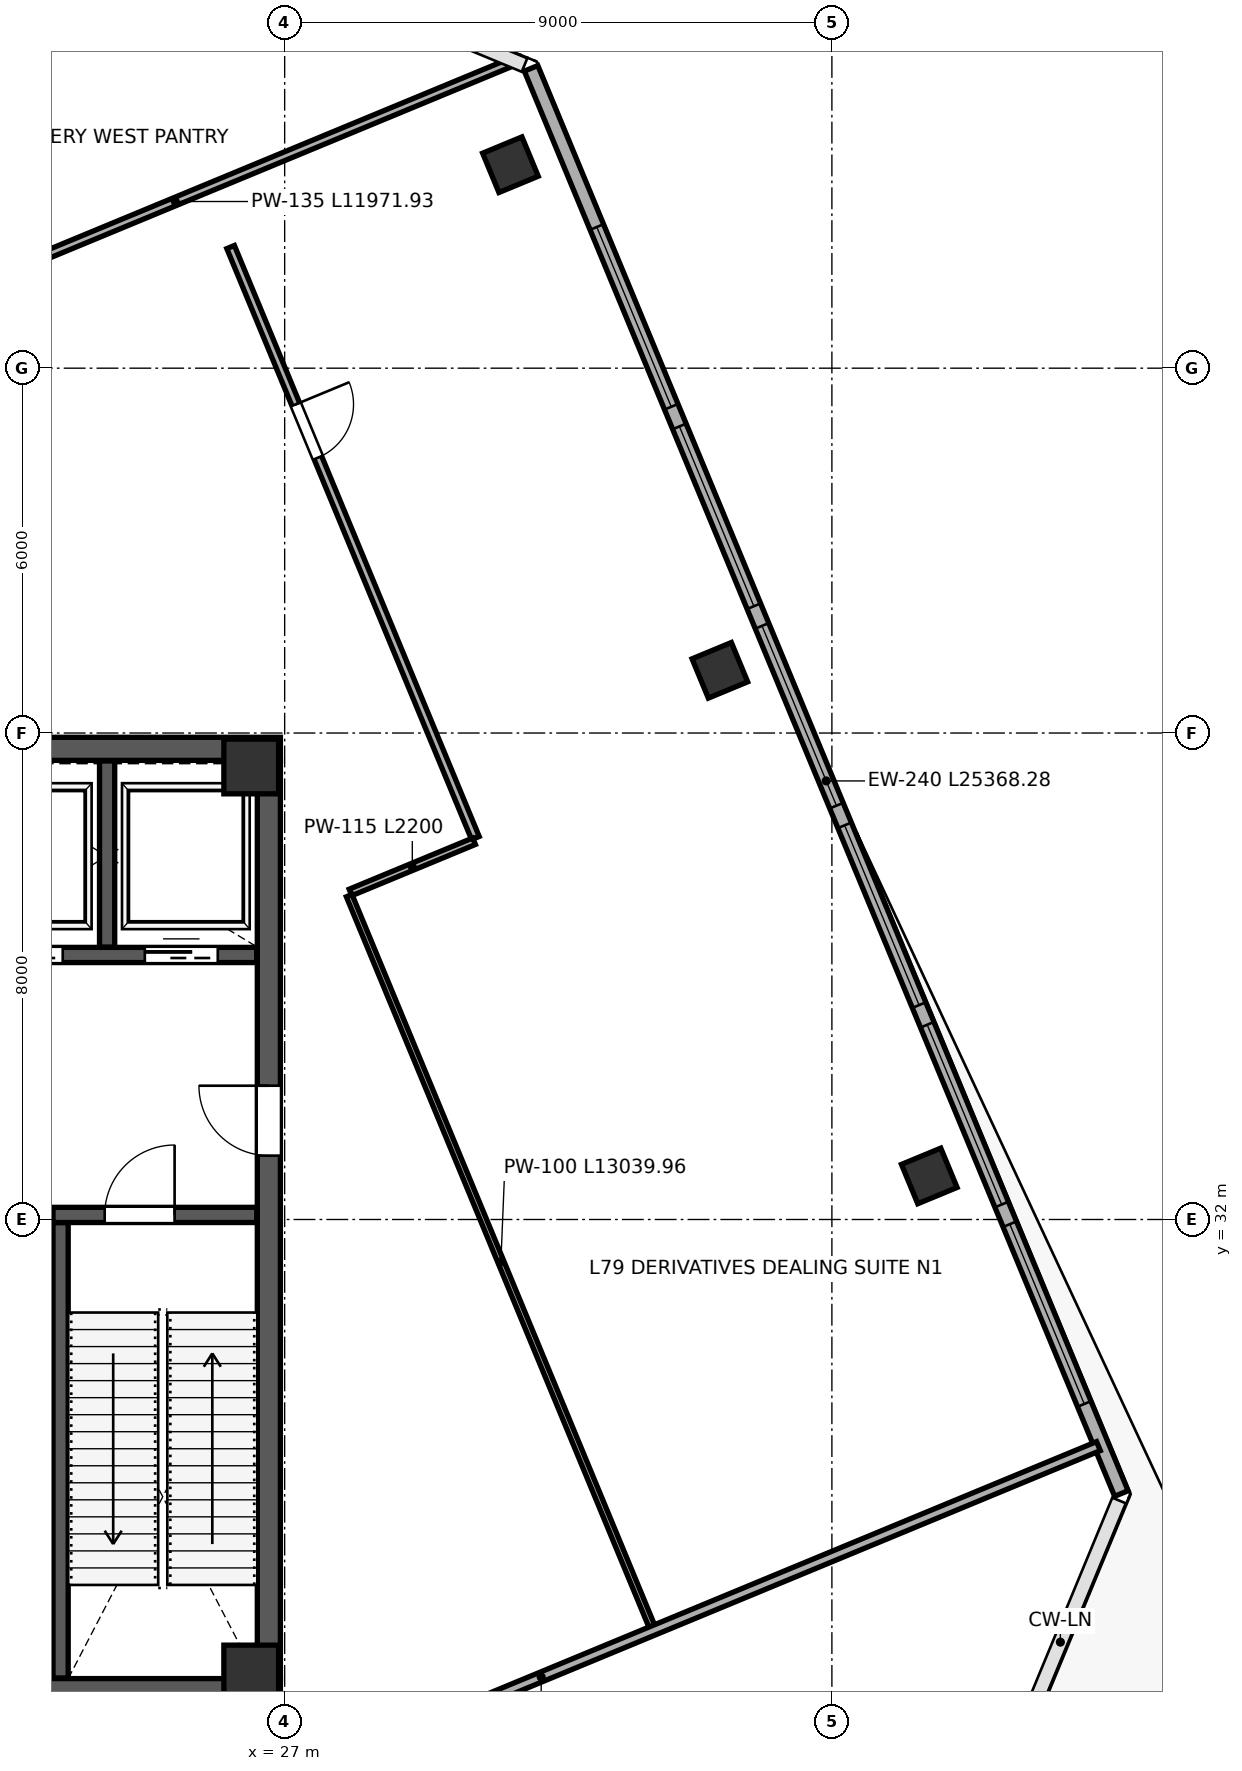
"""IFC4 building model, lengths in metres.
Left out: names, types, materials, properties, quantities, classifications, styles, units other than length and angle.
Written with IfcOpenShell. Run it as: python <this file> out.ifc"""

import sys

from ifc_helpers import new_model, si_unit, direction, frame, frame_2d, origin, origin_2d, place, context, subcontext, project, spatial, rectangle, extrude, source, transform, mapped, element, fill, save


model = new_model("IFC4")
c1 = context("Model", 3, precision=1e-05, world=origin(), true_north=direction((0.0, 1.0)))
c2 = subcontext(c1, "Body", "Model", "MODEL_VIEW")
j1 = project(units=[si_unit("LENGTHUNIT", "METRE"), si_unit("PLANEANGLEUNIT", "RADIAN")], contexts=[c1])
p1 = place(None, origin())
s1 = spatial("IfcSite", under=j1, at=p1, CompositionType="ELEMENT")
p2 = place(p1, origin())
s2 = spatial("IfcBuilding", under=s1, at=p2, CompositionType="ELEMENT")
p3 = place(p2, frame((0.0, 0.0, 349.2)))
s3 = spatial("IfcBuildingStorey", under=s2, at=p3, CompositionType="ELEMENT", Elevation=349.2)
m1 = source(origin(), c2, "Body", "SweptSolid", [
    extrude(rectangle(XDim=0.9, YDim=0.9, at=origin_2d()), origin(), (0.0, 0.0, 1.0), 5.999),
])
for number, where, z_axis, x_axis in (
    (1, (26.45, 24.55, 0.001), (0.0, 0.0, 1.0), (1.0, 0.0, 0.0)),
    (2, (26.45, 39.45, 0.001), (0.0, 0.0, 1.0), (1.0, 0.0, 0.0)),
):
    element("IfcColumn", number, at=place(p3, frame(where, z_axis=z_axis, x_axis=x_axis)), inside=s3, PredefinedType="COLUMN", context=c2, shape_type="MappedRepresentation", body=[
        mapped(m1, transform((0.0, 0.0, 0.0), scale=1.0)),
    ])
m2 = source(origin(), c2, "Body", "SweptSolid", [
    extrude(rectangle(XDim=0.7, YDim=0.7, at=origin_2d()), origin(), (0.0, 0.0, 1.0), 5.999),
])
for number, where, z_axis, x_axis in (
    (3, (30.713, 49.346, 0.001), (0.0, 0.0, 1.0), (-0.383, 0.924, 0.0)),
    (4, (34.157, 41.031, 0.001), (0.0, 0.0, 1.0), (-0.383, 0.924, 0.0)),
    (5, (37.602, 32.716, 0.001), (0.0, 0.0, 1.0), (-0.383, 0.924, 0.0)),
):
    element("IfcColumn", number, at=place(p3, frame(where, z_axis=z_axis, x_axis=x_axis)), inside=s3, PredefinedType="COLUMN", context=c2, shape_type="MappedRepresentation", body=[
        mapped(m2, transform((0.0, 0.0, 0.0), scale=1.0)),
    ])
p4 = place(p3, frame((40.761, 27.494, 0.0), z_axis=(0.0, 0.0, 1.0), x_axis=(-0.382690925775, 0.923876428604, 0.0)))
e6 = element("IfcWall", 6, at=p4, inside=s3, PredefinedType="SOLIDWALL", context=c2, shape_type="SweptSolid", body=[
    extrude(rectangle(XDim=25.368, YDim=0.24, at=frame_2d((12.684, 0.0))), origin(), (0.0, 0.0, 1.0), 5.76),
])
p5 = place(p4, frame((1.594, 0.0, 0.45)))
e7 = element("IfcOpeningElement", 7, at=p5, cuts=e6, PredefinedType="OPENING", context=c2, shape_type="SweptSolid", body=[
    extrude(rectangle(XDim=3.2, YDim=2.5, at=frame_2d((1.6, 1.25))), frame((0.0, 0.13, 0.0), z_axis=(0.0, -1.0, 0.0), x_axis=(1.0, 0.0, 0.0)), (0.0, 0.0, 1.0), 0.26),
])
p6 = place(p4, frame((5.144, 0.0, 0.45)))
e8 = element("IfcOpeningElement", 8, at=p6, cuts=e6, PredefinedType="OPENING", context=c2, shape_type="SweptSolid", body=[
    extrude(rectangle(XDim=3.2, YDim=2.5, at=frame_2d((1.6, 1.25))), frame((0.0, 0.13, 0.0), z_axis=(0.0, -1.0, 0.0), x_axis=(1.0, 0.0, 0.0)), (0.0, 0.0, 1.0), 0.26),
])
p7 = place(p4, frame((8.694, 0.0, 0.45)))
e9 = element("IfcOpeningElement", 9, at=p7, cuts=e6, PredefinedType="OPENING", context=c2, shape_type="SweptSolid", body=[
    extrude(rectangle(XDim=3.2, YDim=2.5, at=frame_2d((1.6, 1.25))), frame((0.0, 0.13, 0.0), z_axis=(0.0, -1.0, 0.0), x_axis=(1.0, 0.0, 0.0)), (0.0, 0.0, 1.0), 0.26),
])
p8 = place(p4, frame((12.244, 0.0, 0.45)))
e10 = element("IfcOpeningElement", 10, at=p8, cuts=e6, PredefinedType="OPENING", context=c2, shape_type="SweptSolid", body=[
    extrude(rectangle(XDim=3.2, YDim=2.5, at=frame_2d((1.6, 1.25))), frame((0.0, 0.13, 0.0), z_axis=(0.0, -1.0, 0.0), x_axis=(1.0, 0.0, 0.0)), (0.0, 0.0, 1.0), 0.26),
])
p9 = place(p4, frame((15.794, 0.0, 0.45)))
e11 = element("IfcOpeningElement", 11, at=p9, cuts=e6, PredefinedType="OPENING", context=c2, shape_type="SweptSolid", body=[
    extrude(rectangle(XDim=3.2, YDim=2.5, at=frame_2d((1.6, 1.25))), frame((0.0, 0.13, 0.0), z_axis=(0.0, -1.0, 0.0), x_axis=(1.0, 0.0, 0.0)), (0.0, 0.0, 1.0), 0.26),
])
p10 = place(p4, frame((19.344, 0.0, 0.45)))
e12 = element("IfcOpeningElement", 12, at=p10, cuts=e6, PredefinedType="OPENING", context=c2, shape_type="SweptSolid", body=[
    extrude(rectangle(XDim=3.2, YDim=2.5, at=frame_2d((1.6, 1.25))), frame((0.0, 0.13, 0.0), z_axis=(0.0, -1.0, 0.0), x_axis=(1.0, 0.0, 0.0)), (0.0, 0.0, 1.0), 0.26),
])
p11 = place(p3, frame((26.171, 52.953, 0.0), z_axis=(0.0, 0.0, 1.0), x_axis=(-0.923878251708, -0.382686524484, 0.0)))
e13 = element("IfcWall", 13, at=p11, inside=s3, PredefinedType="SOLIDWALL", context=c2, shape_type="SweptSolid", body=[
    extrude(rectangle(XDim=26.668, YDim=0.24, at=frame_2d((13.334, 0.0))), origin(), (0.0, 0.0, 1.0), 5.76),
])
p12 = place(p11, frame((13.454, 0.0, 0.45)))
e14 = element("IfcOpeningElement", 14, at=p12, cuts=e13, PredefinedType="OPENING", context=c2, shape_type="SweptSolid", body=[
    extrude(rectangle(XDim=3.2, YDim=2.5, at=frame_2d((1.6, 1.25))), frame((0.0, 0.13, 0.0), z_axis=(0.0, -1.0, 0.0), x_axis=(1.0, 0.0, 0.0)), (0.0, 0.0, 1.0), 0.26),
])
p13 = place(p11, frame((21.304, 0.0, 0.45)))
e15 = element("IfcOpeningElement", 15, at=p13, cuts=e13, PredefinedType="OPENING", context=c2, shape_type="SweptSolid", body=[
    extrude(rectangle(XDim=3.2, YDim=2.5, at=frame_2d((1.6, 1.25))), frame((0.0, 0.13, 0.0), z_axis=(0.0, -1.0, 0.0), x_axis=(1.0, 0.0, 0.0)), (0.0, 0.0, 1.0), 0.26),
])
p14 = place(p3, frame((26.74, 24.45, 0.0), z_axis=(0.0, 0.0, 1.0), x_axis=(0.0, 1.0, 0.0)))
e16 = element("IfcWall", 16, at=p14, inside=s3, PredefinedType="SHEAR", context=c2, shape_type="SweptSolid", body=[
    extrude(rectangle(XDim=15.1, YDim=0.38, at=frame_2d((7.55, 0.0))), origin(), (0.0, 0.0, 1.0), 5.76),
])
p15 = place(p14, frame((8.6, 0.0, 0.0)))
e17 = element("IfcOpeningElement", 17, at=p15, cuts=e16, PredefinedType="OPENING", context=c2, shape_type="SweptSolid", body=[
    extrude(rectangle(XDim=1.15, YDim=2.2, at=frame_2d((0.575, 1.1))), frame((0.0, 0.2, 0.0), z_axis=(0.0, -1.0, 0.0), x_axis=(1.0, 0.0, 0.0)), (0.0, 0.0, 1.0), 0.4),
])
for number, where, z_axis, x_axis in (
    (18, (9.07, 24.26, 0.0), (0.0, 0.0, 1.0), (1.0, 0.0, 0.0)),
    (19, (9.07, 39.74, 0.0), (0.0, 0.0, 1.0), (1.0, 0.0, 0.0)),
):
    element("IfcWall", number, at=place(p3, frame(where, z_axis=z_axis, x_axis=x_axis)), inside=s3, PredefinedType="SHEAR", context=c2, shape_type="SweptSolid", body=[
        extrude(rectangle(XDim=17.86, YDim=0.38, at=frame_2d((8.93, 0.0))), origin(), (0.0, 0.0, 1.0), 5.76),
    ])
p16 = place(p3, frame((23.315, 24.46, 0.0), z_axis=(0.0, 0.0, 1.0), x_axis=(0.0, 1.0, 0.0)))
e20 = element("IfcWall", 20, at=p16, inside=s3, PredefinedType="SHEAR", context=c2, shape_type="SweptSolid", body=[
    extrude(rectangle(XDim=7.49, YDim=0.25, at=frame_2d((3.745, 0.0))), origin(), (0.0, 0.0, 1.0), 5.76),
])
p17 = place(p3, frame((23.19, 32.075, 0.0), z_axis=(0.0, 0.0, 1.0), x_axis=(1.0, 0.0, 0.0)))
e21 = element("IfcWall", 21, at=p17, inside=s3, PredefinedType="SHEAR", context=c2, shape_type="SweptSolid", body=[
    extrude(rectangle(XDim=3.35, YDim=0.25, at=frame_2d((1.675, 0.0))), origin(), (0.0, 0.0, 1.0), 5.76),
])
p18 = place(p17, frame((0.85, 0.0, 0.0)))
e22 = element("IfcOpeningElement", 22, at=p18, cuts=e21, PredefinedType="OPENING", context=c2, shape_type="SweptSolid", body=[
    extrude(rectangle(XDim=1.15, YDim=2.2, at=frame_2d((0.575, 1.1))), frame((0.0, 0.135, 0.0), z_axis=(0.0, -1.0, 0.0), x_axis=(1.0, 0.0, 0.0)), (0.0, 0.0, 1.0), 0.27),
])
p19 = place(p3, frame((21.45, 36.35, 0.0), z_axis=(0.0, 0.0, 1.0), x_axis=(1.0, 0.0, 0.0)))
e23 = element("IfcWall", 23, at=p19, inside=s3, PredefinedType="SHEAR", context=c2, shape_type="SweptSolid", body=[
    extrude(rectangle(XDim=5.09, YDim=0.25, at=frame_2d((2.545, 0.0))), origin(), (0.0, 0.0, 1.0), 5.76),
])
p20 = place(p19, frame((0.7, 0.0, 0.0)))
e24 = element("IfcOpeningElement", 24, at=p20, cuts=e23, PredefinedType="OPENING", context=c2, shape_type="SweptSolid", body=[
    extrude(rectangle(XDim=1.2, YDim=2.2, at=frame_2d((0.6, 1.1))), frame((0.0, 0.135, 0.0), z_axis=(0.0, -1.0, 0.0), x_axis=(1.0, 0.0, 0.0)), (0.0, 0.0, 1.0), 0.27),
])
p21 = place(p19, frame((3.25, 0.0, 0.0)))
e25 = element("IfcOpeningElement", 25, at=p21, cuts=e23, PredefinedType="OPENING", context=c2, shape_type="SweptSolid", body=[
    extrude(rectangle(XDim=1.2, YDim=2.2, at=frame_2d((0.6, 1.1))), frame((0.0, 0.135, 0.0), z_axis=(0.0, -1.0, 0.0), x_axis=(1.0, 0.0, 0.0)), (0.0, 0.0, 1.0), 0.27),
])
p22 = place(p3, frame((24.08, 36.48, 0.0), z_axis=(0.0, 0.0, 1.0), x_axis=(0.0, 1.0, 0.0)))
e26 = element("IfcWall", 26, at=p22, inside=s3, PredefinedType="SHEAR", context=c2, shape_type="SweptSolid", body=[
    extrude(rectangle(XDim=3.06, YDim=0.25, at=frame_2d((1.53, 0.0))), origin(), (0.0, 0.0, 1.0), 5.76),
])
p23 = place(p3, frame((26.111, 47.992, 0.0), z_axis=(0.0, 0.0, 1.0), x_axis=(0.382686563741, -0.923878235447, 0.0)))
e27 = element("IfcWall", 27, at=p23, inside=s3, PredefinedType="PARTITIONING", context=c2, shape_type="SweptSolid", body=[
    extrude(rectangle(XDim=10.52, YDim=0.135, at=frame_2d((5.26, 0.0))), origin(), (0.0, 0.0, 1.0), 5.76),
])
p24 = place(p23, frame((2.8, 0.0, 0.0)))
e28 = element("IfcOpeningElement", 28, at=p24, cuts=e27, PredefinedType="OPENING", context=c2, shape_type="SweptSolid", body=[
    extrude(rectangle(XDim=0.95, YDim=2.15, at=frame_2d((0.475, 1.075))), frame((0.0, 0.078, 0.0), z_axis=(0.0, -1.0, 0.0), x_axis=(1.0, 0.0, 0.0)), (0.0, 0.0, 1.0), 0.155),
])
p25 = place(p3, frame((28.083, 37.378, 0.0), z_axis=(0.0, 0.0, 1.0), x_axis=(0.923853160736, 0.382747093259, 0.0)))
e29 = element("IfcWall", 29, at=p25, inside=s3, PredefinedType="PARTITIONING", context=c2, shape_type="SweptSolid", body=[
    extrude(rectangle(XDim=2.2, YDim=0.115, at=frame_2d((1.1, 0.0))), origin(), (0.0, 0.0, 1.0), 5.76),
])
p26 = place(p3, frame((28.061, 37.326, 0.0), z_axis=(0.0, 0.0, 1.0), x_axis=(0.382702889353, -0.923871472923, 0.0)))
e30 = element("IfcWall", 30, at=p26, inside=s3, PredefinedType="PARTITIONING", context=c2, shape_type="SweptSolid", body=[
    extrude(rectangle(XDim=13.04, YDim=0.1, at=frame_2d((6.52, 0.0))), origin(), (0.0, 0.0, 1.0), 5.76),
])
p27 = place(p3, frame((19.671, 46.45, 0.0), z_axis=(0.0, 0.0, 1.0), x_axis=(0.923879139167, 0.38268438198, 0.0)))
e31 = element("IfcWall", 31, at=p27, inside=s3, PredefinedType="PARTITIONING", context=c2, shape_type="SweptSolid", body=[
    extrude(rectangle(XDim=11.972, YDim=0.135, at=frame_2d((5.986, 0.0))), origin(), (0.0, 0.0, 1.0), 5.76),
])
p28 = place(p3, frame((22.054, 20.68, 0.0), z_axis=(0.0, 0.0, 1.0), x_axis=(0.923880950116, 0.382680009946, 0.0)))
e32 = element("IfcWall", 32, at=p28, inside=s3, PredefinedType="PARTITIONING", context=c2, shape_type="SweptSolid", body=[
    extrude(rectangle(XDim=19.84, YDim=0.16, at=frame_2d((9.92, 0.0))), origin(), (0.0, 0.0, 1.0), 5.76),
])
m3 = source(origin(), c2, "Body", "SweptSolid", [
    extrude(rectangle(XDim=3.2, YDim=2.5, at=frame_2d((1.6, 1.25))), frame((0.0, 0.03, 0.0), z_axis=(0.0, -1.0, 0.0), x_axis=(1.0, 0.0, 0.0)), (0.0, 0.0, 1.0), 0.06),
])
p29 = place(p5, origin())
e33 = element("IfcWindow", 33, at=p29, inside=s3, PartitioningType="TRIPLE_PANEL_VERTICAL", PredefinedType="WINDOW", context=c2, shape_type="MappedRepresentation", body=[
    mapped(m3, transform((0.0, 0.0, 0.0), scale=1.0)),
])
fill(e7, e33)
p30 = place(p6, origin())
e34 = element("IfcWindow", 34, at=p30, inside=s3, PartitioningType="TRIPLE_PANEL_VERTICAL", PredefinedType="WINDOW", context=c2, shape_type="MappedRepresentation", body=[
    mapped(m3, transform((0.0, 0.0, 0.0), scale=1.0)),
])
fill(e8, e34)
p31 = place(p7, origin())
e35 = element("IfcWindow", 35, at=p31, inside=s3, PartitioningType="TRIPLE_PANEL_VERTICAL", PredefinedType="WINDOW", context=c2, shape_type="MappedRepresentation", body=[
    mapped(m3, transform((0.0, 0.0, 0.0), scale=1.0)),
])
fill(e9, e35)
p32 = place(p8, origin())
e36 = element("IfcWindow", 36, at=p32, inside=s3, PartitioningType="TRIPLE_PANEL_VERTICAL", PredefinedType="WINDOW", context=c2, shape_type="MappedRepresentation", body=[
    mapped(m3, transform((0.0, 0.0, 0.0), scale=1.0)),
])
fill(e10, e36)
p33 = place(p9, origin())
e37 = element("IfcWindow", 37, at=p33, inside=s3, PartitioningType="TRIPLE_PANEL_VERTICAL", PredefinedType="WINDOW", context=c2, shape_type="MappedRepresentation", body=[
    mapped(m3, transform((0.0, 0.0, 0.0), scale=1.0)),
])
fill(e11, e37)
p34 = place(p10, origin())
e38 = element("IfcWindow", 38, at=p34, inside=s3, PartitioningType="TRIPLE_PANEL_VERTICAL", PredefinedType="WINDOW", context=c2, shape_type="MappedRepresentation", body=[
    mapped(m3, transform((0.0, 0.0, 0.0), scale=1.0)),
])
fill(e12, e38)
m4 = source(origin(), c2, "Body", "SweptSolid", [
    extrude(rectangle(XDim=1.15, YDim=2.2, at=frame_2d((0.575, 1.1))), frame((0.0, 0.025, 0.0), z_axis=(0.0, -1.0, 0.0), x_axis=(1.0, 0.0, 0.0)), (0.0, 0.0, 1.0), 0.05),
])
p35 = place(p18, origin())
e39 = element("IfcDoor", 39, at=p35, inside=s3, OperationType="SINGLE_SWING_RIGHT", PredefinedType="DOOR", context=c2, shape_type="MappedRepresentation", body=[
    mapped(m4, transform((0.0, 0.0, 0.0), scale=1.0)),
])
fill(e22, e39)
m5 = source(origin(), c2, "Body", "SweptSolid", [
    extrude(rectangle(XDim=1.15, YDim=2.2, at=frame_2d((0.575, 1.1))), frame((0.0, 0.025, 0.0), z_axis=(0.0, -1.0, 0.0), x_axis=(1.0, 0.0, 0.0)), (0.0, 0.0, 1.0), 0.05),
])
p36 = place(p15, origin())
e40 = element("IfcDoor", 40, at=p36, inside=s3, OperationType="SINGLE_SWING_RIGHT", PredefinedType="DOOR", context=c2, shape_type="MappedRepresentation", body=[
    mapped(m5, transform((0.0, 0.0, 0.0), scale=1.0)),
])
fill(e17, e40)
m6 = source(origin(), c2, "Body", "SweptSolid", [
    extrude(rectangle(XDim=1.2, YDim=2.2, at=frame_2d((0.6, 1.1))), frame((0.0, 0.025, 0.0), z_axis=(0.0, -1.0, 0.0), x_axis=(1.0, 0.0, 0.0)), (0.0, 0.0, 1.0), 0.05),
])
p37 = place(p20, origin())
e41 = element("IfcDoor", 41, at=p37, inside=s3, OperationType="SLIDING_TO_LEFT", PredefinedType="DOOR", context=c2, shape_type="MappedRepresentation", body=[
    mapped(m6, transform((0.0, 0.0, 0.0), scale=1.0)),
])
fill(e24, e41)
p38 = place(p21, origin())
e42 = element("IfcDoor", 42, at=p38, inside=s3, OperationType="SLIDING_TO_RIGHT", PredefinedType="DOOR", context=c2, shape_type="MappedRepresentation", body=[
    mapped(m6, transform((0.0, 0.0, 0.0), scale=1.0)),
])
fill(e25, e42)
m7 = source(origin(), c2, "Body", "SweptSolid", [
    extrude(rectangle(XDim=0.95, YDim=2.15, at=frame_2d((0.475, 1.075))), frame((0.0, 0.025, 0.0), z_axis=(0.0, -1.0, 0.0), x_axis=(1.0, 0.0, 0.0)), (0.0, 0.0, 1.0), 0.05),
])
p39 = place(p24, origin())
e43 = element("IfcDoor", 43, at=p39, inside=s3, OperationType="SINGLE_SWING_LEFT", PredefinedType="DOOR", context=c2, shape_type="MappedRepresentation", body=[
    mapped(m7, transform((0.0, 0.0, 0.0), scale=1.0)),
])
fill(e28, e43)
save(model, sys.argv[1])
